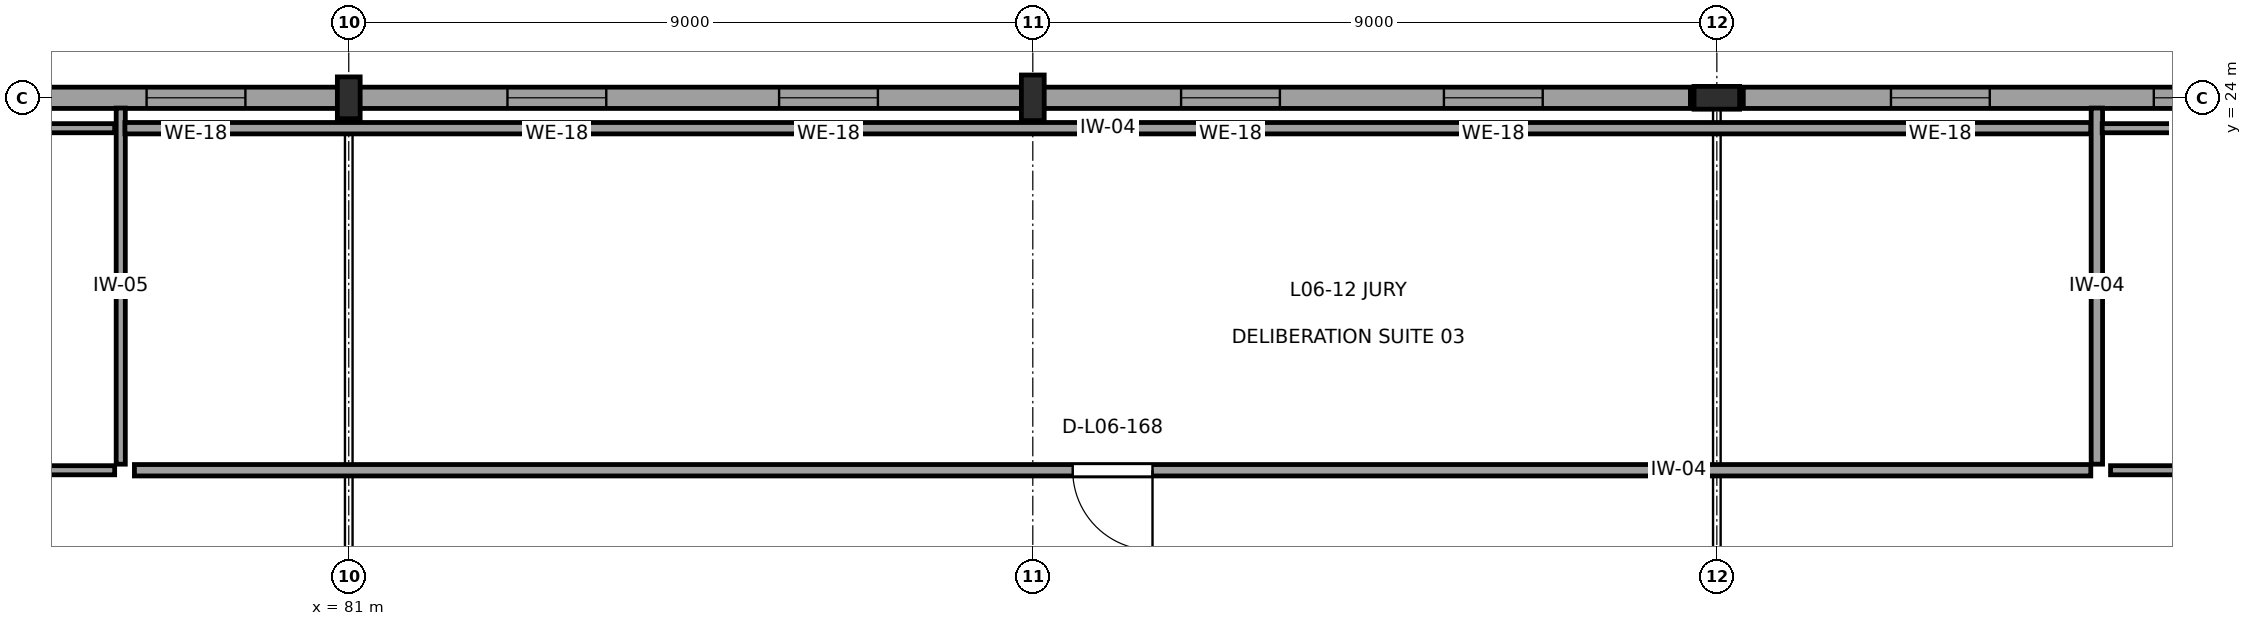
"""IFC4 building model, lengths in metres.
Left out: names, types, materials, properties, quantities, classifications, styles, units other than length and angle.
Written with IfcOpenShell. Run it as: python <this file> out.ifc"""

import sys

from ifc_helpers import new_model, si_unit, direction, frame, frame_2d, origin, origin_2d, place, context, subcontext, project, spatial, rectangle, i_section, extrude, element, fill, save


model = new_model("IFC4")
c1 = context("Model", 3, precision=1e-05, world=origin(), true_north=direction((0.0, 1.0)))
c2 = subcontext(c1, "Body", "Model", "MODEL_VIEW")
j1 = project(units=[si_unit("LENGTHUNIT", "METRE"), si_unit("PLANEANGLEUNIT", "RADIAN")], contexts=[c1])
p1 = place(None, origin())
s1 = spatial("IfcSite", under=j1, at=p1, CompositionType="ELEMENT")
p2 = place(p1, origin())
s2 = spatial("IfcBuilding", under=s1, at=p2, CompositionType="ELEMENT")
p3 = place(p2, frame((0.0, 0.0, 27.4)))
s3 = spatial("IfcBuildingStorey", under=s2, at=p3, CompositionType="ELEMENT", Elevation=27.4)
p4 = place(p3, frame((81.0, 24.0, 0.0), z_axis=(0.0, 0.0, 1.0), x_axis=(1.0, 0.0, 0.0)))
e1 = element("IfcColumn", 1, at=p4, inside=s3, PredefinedType="COLUMN", context=c2, shape_type="SweptSolid", body=[
    extrude(i_section(OverallWidth=0.3, OverallDepth=0.55, WebThickness=0.015, FlangeThickness=0.029, at=origin_2d()), origin(), (0.0, 0.0, 1.0), 4.0),
])
for number, where, z_axis, x_axis in (
    (2, (90.0, 24.0, 0.0), (0.0, 0.0, 1.0), (1.0, 0.0, 0.0)),
    (3, (99.0, 24.0, 0.0), (0.0, 0.0, 1.0), (0.0, 1.0, 0.0)),
):
    element("IfcColumn", number, at=place(p3, frame(where, z_axis=z_axis, x_axis=x_axis)), inside=s3, PredefinedType="COLUMN", context=c2, shape_type="SweptSolid", body=[
        extrude(i_section(OverallWidth=0.3, OverallDepth=0.6, WebThickness=0.015, FlangeThickness=0.03, at=origin_2d()), origin(), (0.0, 0.0, 1.0), 4.0),
    ])
p5 = place(p3, frame((80.942, 24.0, 0.0), z_axis=(0.0, 0.0, 1.0), x_axis=(-1.0, 0.0, 0.0)))
e4 = element("IfcWall", 4, at=p5, inside=s3, PredefinedType="SOLIDWALL", context=c2, shape_type="SweptSolid", body=[
    extrude(rectangle(XDim=8.934, YDim=0.28, at=frame_2d((4.467, 0.0))), origin(), (0.0, 0.0, 1.0), 3.305),
])
p6 = place(p5, frame((1.302, 0.0, 1.05)))
e5 = element("IfcOpeningElement", 5, at=p6, cuts=e4, PredefinedType="OPENING", context=c2, shape_type="SweptSolid", body=[
    extrude(rectangle(XDim=1.3, YDim=1.3, at=frame_2d((0.65, 0.65))), frame((0.0, 0.155, 0.0), z_axis=(0.0, -1.0, 0.0), x_axis=(1.0, 0.0, 0.0)), (0.0, 0.0, 1.0), 0.31),
])
p7 = place(p5, frame((5.604, 0.0, 1.05)))
e6 = element("IfcOpeningElement", 6, at=p7, cuts=e4, PredefinedType="OPENING", context=c2, shape_type="SweptSolid", body=[
    extrude(rectangle(XDim=1.3, YDim=1.3, at=frame_2d((0.65, 0.65))), frame((0.0, 0.155, 0.0), z_axis=(0.0, -1.0, 0.0), x_axis=(1.0, 0.0, 0.0)), (0.0, 0.0, 1.0), 0.31),
])
p8 = place(p3, frame((98.652, 24.0, 0.0), z_axis=(0.0, 0.0, 1.0), x_axis=(-1.0, 0.0, 0.0)))
e7 = element("IfcWall", 7, at=p8, inside=s3, PredefinedType="SOLIDWALL", context=c2, shape_type="SweptSolid", body=[
    extrude(rectangle(XDim=8.644, YDim=0.28, at=frame_2d((4.322, 0.0))), origin(), (0.0, 0.0, 1.0), 3.305),
])
p9 = place(p8, frame((1.943, 0.0, 1.05)))
e8 = element("IfcOpeningElement", 8, at=p9, cuts=e7, PredefinedType="OPENING", context=c2, shape_type="SweptSolid", body=[
    extrude(rectangle(XDim=1.3, YDim=1.3, at=frame_2d((0.65, 0.65))), frame((0.0, 0.155, 0.0), z_axis=(0.0, -1.0, 0.0), x_axis=(1.0, 0.0, 0.0)), (0.0, 0.0, 1.0), 0.31),
])
p10 = place(p8, frame((5.401, 0.0, 1.05)))
e9 = element("IfcOpeningElement", 9, at=p10, cuts=e7, PredefinedType="OPENING", context=c2, shape_type="SweptSolid", body=[
    extrude(rectangle(XDim=1.3, YDim=1.3, at=frame_2d((0.65, 0.65))), frame((0.0, 0.155, 0.0), z_axis=(0.0, -1.0, 0.0), x_axis=(1.0, 0.0, 0.0)), (0.0, 0.0, 1.0), 0.31),
])
p11 = place(p3, frame((89.992, 24.0, 0.0), z_axis=(0.0, 0.0, 1.0), x_axis=(-1.0, 0.0, 0.0)))
e10 = element("IfcWall", 10, at=p11, inside=s3, PredefinedType="SOLIDWALL", context=c2, shape_type="SweptSolid", body=[
    extrude(rectangle(XDim=8.934, YDim=0.28, at=frame_2d((4.467, 0.0))), origin(), (0.0, 0.0, 1.0), 3.305),
])
p12 = place(p11, frame((2.03, 0.0, 1.05)))
e11 = element("IfcOpeningElement", 11, at=p12, cuts=e10, PredefinedType="OPENING", context=c2, shape_type="SweptSolid", body=[
    extrude(rectangle(XDim=1.3, YDim=1.3, at=frame_2d((0.65, 0.65))), frame((0.0, 0.155, 0.0), z_axis=(0.0, -1.0, 0.0), x_axis=(1.0, 0.0, 0.0)), (0.0, 0.0, 1.0), 0.31),
])
p13 = place(p11, frame((5.604, 0.0, 1.05)))
e12 = element("IfcOpeningElement", 12, at=p13, cuts=e10, PredefinedType="OPENING", context=c2, shape_type="SweptSolid", body=[
    extrude(rectangle(XDim=1.3, YDim=1.3, at=frame_2d((0.65, 0.65))), frame((0.0, 0.155, 0.0), z_axis=(0.0, -1.0, 0.0), x_axis=(1.0, 0.0, 0.0)), (0.0, 0.0, 1.0), 0.31),
])
p14 = place(p3, frame((107.992, 24.0, 0.0), z_axis=(0.0, 0.0, 1.0), x_axis=(-1.0, 0.0, 0.0)))
e13 = element("IfcWall", 13, at=p14, inside=s3, PredefinedType="SOLIDWALL", context=c2, shape_type="SweptSolid", body=[
    extrude(rectangle(XDim=8.644, YDim=0.28, at=frame_2d((4.322, 0.0))), origin(), (0.0, 0.0, 1.0), 3.305),
])
p15 = place(p14, frame((1.943, 0.0, 1.05)))
e14 = element("IfcOpeningElement", 14, at=p15, cuts=e13, PredefinedType="OPENING", context=c2, shape_type="SweptSolid", body=[
    extrude(rectangle(XDim=1.3, YDim=1.3, at=frame_2d((0.65, 0.65))), frame((0.0, 0.155, 0.0), z_axis=(0.0, -1.0, 0.0), x_axis=(1.0, 0.0, 0.0)), (0.0, 0.0, 1.0), 0.31),
])
p16 = place(p14, frame((5.401, 0.0, 1.05)))
e15 = element("IfcOpeningElement", 15, at=p16, cuts=e13, PredefinedType="OPENING", context=c2, shape_type="SweptSolid", body=[
    extrude(rectangle(XDim=1.3, YDim=1.3, at=frame_2d((0.65, 0.65))), frame((0.0, 0.155, 0.0), z_axis=(0.0, -1.0, 0.0), x_axis=(1.0, 0.0, 0.0)), (0.0, 0.0, 1.0), 0.31),
])
p17 = place(p3, frame((77.92, 19.1, 0.0), z_axis=(0.0, 0.0, 1.0), x_axis=(-1.0, 0.0, 0.0)))
e16 = element("IfcWall", 16, at=p17, inside=s3, PredefinedType="PARTITIONING", context=c2, shape_type="SweptSolid", body=[
    extrude(rectangle(XDim=45.385, YDim=0.12, at=frame_2d((22.692, 0.0))), origin(), (0.0, 0.0, 1.0), 3.64),
])
p18 = place(p17, frame((22.218, 0.0, 0.0)))
e17 = element("IfcOpeningElement", 17, at=p18, cuts=e16, PredefinedType="OPENING", context=c2, shape_type="SweptSolid", body=[
    extrude(rectangle(XDim=0.95, YDim=2.15, at=frame_2d((0.475, 1.075))), frame((0.0, 0.075, 0.0), z_axis=(0.0, -1.0, 0.0), x_axis=(1.0, 0.0, 0.0)), (0.0, 0.0, 1.0), 0.15),
])
p19 = place(p3, frame((32.955, 23.6, 0.0), z_axis=(0.0, 0.0, 1.0), x_axis=(1.0, 0.0, 0.0)))
e18 = element("IfcWall", 18, at=p19, inside=s3, PredefinedType="PARTITIONING", context=c2, shape_type="SweptSolid", body=[
    extrude(rectangle(XDim=44.965, YDim=0.12, at=frame_2d((22.482, 0.0))), origin(), (0.0, 0.0, 1.0), 3.64),
])
p20 = place(p3, frame((78.0, 23.865, 0.0), z_axis=(0.0, 0.0, 1.0), x_axis=(0.0, -1.0, 0.0)))
e19 = element("IfcWall", 19, at=p20, inside=s3, PredefinedType="PARTITIONING", context=c2, shape_type="SweptSolid", body=[
    extrude(rectangle(XDim=4.685, YDim=0.12, at=frame_2d((2.343, 0.0))), origin(), (0.0, 0.0, 1.0), 3.64),
])
p21 = place(p3, frame((78.055, 23.6, 0.0), z_axis=(0.0, 0.0, 1.0), x_axis=(1.0, 0.0, 0.0)))
e20 = element("IfcWall", 20, at=p21, inside=s3, PredefinedType="PARTITIONING", context=c2, shape_type="SweptSolid", body=[
    extrude(rectangle(XDim=25.865, YDim=0.15, at=frame_2d((12.933, 0.0))), origin(), (0.0, 0.0, 1.0), 3.64),
])
p22 = place(p3, frame((104.0, 23.865, 0.0), z_axis=(0.0, 0.0, 1.0), x_axis=(0.0, -1.0, 0.0)))
e21 = element("IfcWall", 21, at=p22, inside=s3, PredefinedType="PARTITIONING", context=c2, shape_type="SweptSolid", body=[
    extrude(rectangle(XDim=4.685, YDim=0.15, at=frame_2d((2.343, 0.0))), origin(), (0.0, 0.0, 1.0), 3.64),
])
p23 = place(p3, frame((103.92, 19.1, 0.0), z_axis=(0.0, 0.0, 1.0), x_axis=(-1.0, 0.0, 0.0)))
e22 = element("IfcWall", 22, at=p23, inside=s3, PredefinedType="PARTITIONING", context=c2, shape_type="SweptSolid", body=[
    extrude(rectangle(XDim=25.74, YDim=0.15, at=frame_2d((12.87, 0.0))), origin(), (0.0, 0.0, 1.0), 3.64),
])
p24 = place(p23, frame((12.345, 0.0, 0.0)))
e23 = element("IfcOpeningElement", 23, at=p24, cuts=e22, PredefinedType="OPENING", context=c2, shape_type="SweptSolid", body=[
    extrude(rectangle(XDim=1.05, YDim=2.25, at=frame_2d((0.525, 1.125))), frame((0.0, 0.09, 0.0), z_axis=(0.0, -1.0, 0.0), x_axis=(1.0, 0.0, 0.0)), (0.0, 0.0, 1.0), 0.18),
])
p25 = place(p3, frame((125.865, 19.1, 0.0), z_axis=(0.0, 0.0, 1.0), x_axis=(-1.0, 0.0, 0.0)))
e24 = element("IfcWall", 24, at=p25, inside=s3, PredefinedType="PARTITIONING", context=c2, shape_type="SweptSolid", body=[
    extrude(rectangle(XDim=21.685, YDim=0.12, at=frame_2d((10.843, 0.0))), origin(), (0.0, 0.0, 1.0), 3.64),
])
p26 = place(p25, frame((10.392, 0.0, 0.0)))
e25 = element("IfcOpeningElement", 25, at=p26, cuts=e24, PredefinedType="OPENING", context=c2, shape_type="SweptSolid", body=[
    extrude(rectangle(XDim=0.9, YDim=2.1, at=frame_2d((0.45, 1.05))), frame((0.0, 0.075, 0.0), z_axis=(0.0, -1.0, 0.0), x_axis=(1.0, 0.0, 0.0)), (0.0, 0.0, 1.0), 0.15),
])
p27 = place(p3, frame((104.07, 23.6, 0.0), z_axis=(0.0, 0.0, 1.0), x_axis=(1.0, 0.0, 0.0)))
e26 = element("IfcWall", 26, at=p27, inside=s3, PredefinedType="PARTITIONING", context=c2, shape_type="SweptSolid", body=[
    extrude(rectangle(XDim=21.375, YDim=0.12, at=frame_2d((10.688, 0.0))), origin(), (0.0, 0.0, 1.0), 3.64),
])
p28 = place(p6, origin())
e27 = element("IfcWindow", 27, at=p28, inside=s3, PartitioningType="SINGLE_PANEL", PredefinedType="WINDOW", context=c2, shape_type="SweptSolid", body=[
    extrude(rectangle(XDim=1.3, YDim=1.3, at=frame_2d((0.65, 0.65))), frame((0.0, 0.03, 0.0), z_axis=(0.0, -1.0, 0.0), x_axis=(1.0, 0.0, 0.0)), (0.0, 0.0, 1.0), 0.06),
])
fill(e5, e27)
p29 = place(p9, origin())
e28 = element("IfcWindow", 28, at=p29, inside=s3, PartitioningType="SINGLE_PANEL", PredefinedType="WINDOW", context=c2, shape_type="SweptSolid", body=[
    extrude(rectangle(XDim=1.3, YDim=1.3, at=frame_2d((0.65, 0.65))), frame((0.0, 0.03, 0.0), z_axis=(0.0, -1.0, 0.0), x_axis=(1.0, 0.0, 0.0)), (0.0, 0.0, 1.0), 0.06),
])
fill(e8, e28)
p30 = place(p10, origin())
e29 = element("IfcWindow", 29, at=p30, inside=s3, PartitioningType="SINGLE_PANEL", PredefinedType="WINDOW", context=c2, shape_type="SweptSolid", body=[
    extrude(rectangle(XDim=1.3, YDim=1.3, at=frame_2d((0.65, 0.65))), frame((0.0, 0.03, 0.0), z_axis=(0.0, -1.0, 0.0), x_axis=(1.0, 0.0, 0.0)), (0.0, 0.0, 1.0), 0.06),
])
fill(e9, e29)
p31 = place(p12, origin())
e30 = element("IfcWindow", 30, at=p31, inside=s3, PartitioningType="SINGLE_PANEL", PredefinedType="WINDOW", context=c2, shape_type="SweptSolid", body=[
    extrude(rectangle(XDim=1.3, YDim=1.3, at=frame_2d((0.65, 0.65))), frame((0.0, 0.03, 0.0), z_axis=(0.0, -1.0, 0.0), x_axis=(1.0, 0.0, 0.0)), (0.0, 0.0, 1.0), 0.06),
])
fill(e11, e30)
p32 = place(p13, origin())
e31 = element("IfcWindow", 31, at=p32, inside=s3, PartitioningType="SINGLE_PANEL", PredefinedType="WINDOW", context=c2, shape_type="SweptSolid", body=[
    extrude(rectangle(XDim=1.3, YDim=1.3, at=frame_2d((0.65, 0.65))), frame((0.0, 0.03, 0.0), z_axis=(0.0, -1.0, 0.0), x_axis=(1.0, 0.0, 0.0)), (0.0, 0.0, 1.0), 0.06),
])
fill(e12, e31)
p33 = place(p15, origin())
e32 = element("IfcWindow", 32, at=p33, inside=s3, PartitioningType="SINGLE_PANEL", PredefinedType="WINDOW", context=c2, shape_type="SweptSolid", body=[
    extrude(rectangle(XDim=1.3, YDim=1.3, at=frame_2d((0.65, 0.65))), frame((0.0, 0.03, 0.0), z_axis=(0.0, -1.0, 0.0), x_axis=(1.0, 0.0, 0.0)), (0.0, 0.0, 1.0), 0.06),
])
fill(e14, e32)
p34 = place(p16, origin())
e33 = element("IfcWindow", 33, at=p34, inside=s3, PartitioningType="SINGLE_PANEL", PredefinedType="WINDOW", context=c2, shape_type="SweptSolid", body=[
    extrude(rectangle(XDim=1.3, YDim=1.3, at=frame_2d((0.65, 0.65))), frame((0.0, 0.03, 0.0), z_axis=(0.0, -1.0, 0.0), x_axis=(1.0, 0.0, 0.0)), (0.0, 0.0, 1.0), 0.06),
])
fill(e15, e33)
p35 = place(p24, origin())
e34 = element("IfcDoor", 34, at=p35, inside=s3, OperationType="SINGLE_SWING_LEFT", PredefinedType="DOOR", context=c2, shape_type="SweptSolid", body=[
    extrude(rectangle(XDim=1.05, YDim=2.25, at=frame_2d((0.525, 1.125))), frame((0.0, 0.025, 0.0), z_axis=(0.0, -1.0, 0.0), x_axis=(1.0, 0.0, 0.0)), (0.0, 0.0, 1.0), 0.05),
])
fill(e23, e34)
save(model, sys.argv[1])
